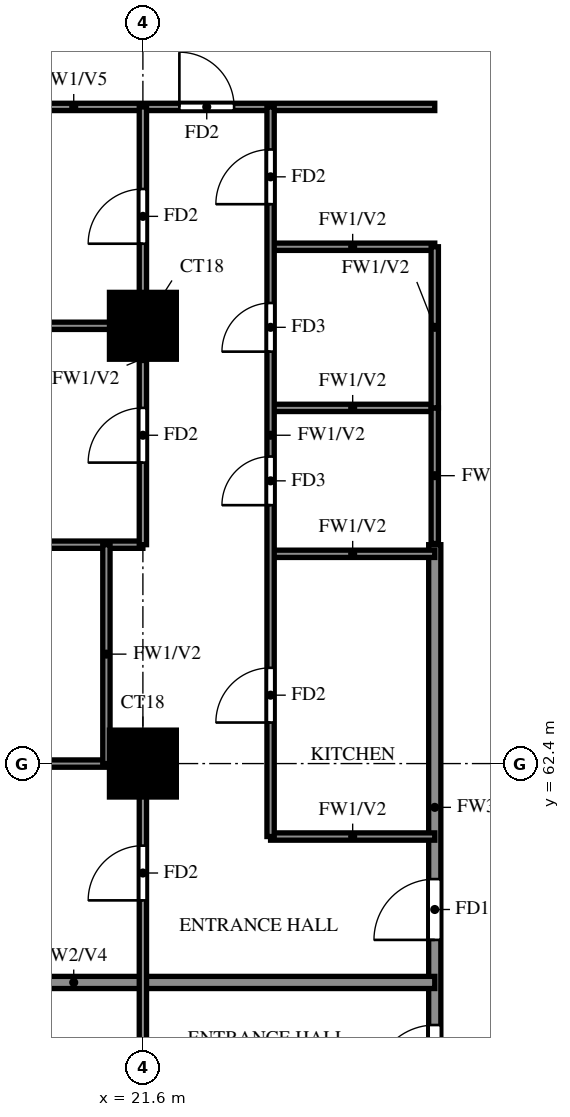
"""IFC4 building model, lengths in metres.
Left out: names, types, materials, properties, quantities, classifications, styles, units other than length and angle.
Written with IfcOpenShell. Run it as: python <this file> out.ifc"""

import sys

from ifc_helpers import new_model, si_unit, direction, frame, frame_2d, origin, origin_2d, place, context, subcontext, project, spatial, rectangle, extrude, source, transform, mapped, element, fill, save


model = new_model("IFC4")
c1 = context("Model", 3, precision=1e-05, world=origin(), true_north=direction((0.0, 1.0)))
c2 = subcontext(c1, "Body", "Model", "MODEL_VIEW")
j1 = project(units=[si_unit("LENGTHUNIT", "METRE"), si_unit("PLANEANGLEUNIT", "RADIAN")], contexts=[c1])
p1 = place(None, origin())
s1 = spatial("IfcSite", under=j1, at=p1, CompositionType="ELEMENT")
p2 = place(p1, origin())
s2 = spatial("IfcBuilding", under=s1, at=p2, CompositionType="ELEMENT")
p3 = place(p2, frame((0.0, 0.0, 127.0)))
s3 = spatial("IfcBuildingStorey", under=s2, at=p3, CompositionType="ELEMENT", Elevation=127.0)
m1 = source(origin(), c2, "Body", "SweptSolid", [
    extrude(rectangle(XDim=1.1, YDim=1.1, at=origin_2d()), origin(), (0.0, 0.0, 1.0), 3.2),
])
for number, where, z_axis, x_axis in (
    (1, (21.6, 62.4, 0.0), (0.0, 0.0, 1.0), (1.0, 0.0, 0.0)),
    (2, (21.6, 69.6, 0.0), (0.0, 0.0, 1.0), (1.0, 0.0, 0.0)),
):
    element("IfcColumn", number, at=place(p3, frame(where, z_axis=z_axis, x_axis=x_axis)), inside=s3, PredefinedType="COLUMN", context=c2, shape_type="MappedRepresentation", body=[
        mapped(m1, transform((0.0, 0.0, 0.0))),
    ])
p4 = place(p3, frame((26.4, 56.4, 0.0), z_axis=(0.0, 0.0, 1.0), x_axis=(0.0, 1.0, 0.0)))
e3 = element("IfcWall", 3, at=p4, inside=s3, PredefinedType="SOLIDWALL", context=c2, shape_type="SweptSolid", body=[
    extrude(rectangle(XDim=9.6, YDim=0.2, at=frame_2d((4.8, 0.0))), origin(), (0.0, 0.0, 1.0), 3.2),
])
p5 = place(p4, frame((0.7, 0.0, 0.0)))
e4 = element("IfcOpeningElement", 4, at=p5, cuts=e3, PredefinedType="OPENING", context=c2, shape_type="SweptSolid", body=[
    extrude(rectangle(XDim=1.0, YDim=2.1, at=frame_2d((0.5, 1.05))), frame((0.0, 0.11, 0.0), z_axis=(0.0, -1.0, 0.0), x_axis=(1.0, 0.0, 0.0)), (0.0, 0.0, 1.0), 0.22),
])
p6 = place(p4, frame((3.1, 0.0, 0.0)))
e5 = element("IfcOpeningElement", 5, at=p6, cuts=e3, PredefinedType="OPENING", context=c2, shape_type="SweptSolid", body=[
    extrude(rectangle(XDim=1.0, YDim=2.1, at=frame_2d((0.5, 1.05))), frame((0.0, 0.11, 0.0), z_axis=(0.0, -1.0, 0.0), x_axis=(1.0, 0.0, 0.0)), (0.0, 0.0, 1.0), 0.22),
])
p7 = place(p3, frame((14.525, 58.8, 0.0), z_axis=(0.0, 0.0, 1.0), x_axis=(1.0, 0.0, 0.0)))
e6 = element("IfcWall", 6, at=p7, inside=s3, PredefinedType="SOLIDWALL", context=c2, shape_type="SweptSolid", body=[
    extrude(rectangle(XDim=11.875, YDim=0.2, at=frame_2d((5.938, 0.0))), origin(), (0.0, 0.0, 1.0), 2.3),
])
p8 = place(p3, frame((23.7, 61.2, 0.0), z_axis=(0.0, 0.0, 1.0), x_axis=(1.0, 0.0, 0.0)))
e7 = element("IfcWall", 7, at=p8, inside=s3, PredefinedType="PARTITIONING", context=c2, shape_type="SweptSolid", body=[
    extrude(rectangle(XDim=2.7, YDim=0.12, at=frame_2d((1.35, 0.0))), origin(), (0.0, 0.0, 1.0), 3.2),
])
p9 = place(p3, frame((14.525, 62.4, 0.0), z_axis=(0.0, 0.0, 1.0), x_axis=(1.0, 0.0, 0.0)))
e8 = element("IfcWall", 8, at=p9, inside=s3, PredefinedType="PARTITIONING", context=c2, shape_type="SweptSolid", body=[
    extrude(rectangle(XDim=7.075, YDim=0.12, at=frame_2d((3.538, 0.0))), origin(), (0.0, 0.0, 1.0), 3.2),
])
p10 = place(p9, frame((2.837, 0.0, 0.0)))
e9 = element("IfcOpeningElement", 9, at=p10, cuts=e8, PredefinedType="OPENING", context=c2, shape_type="SweptSolid", body=[
    extrude(rectangle(XDim=0.8, YDim=2.1, at=frame_2d((0.4, 1.05))), frame((0.0, 0.07, 0.0), z_axis=(0.0, -1.0, 0.0), x_axis=(1.0, 0.0, 0.0)), (0.0, 0.0, 1.0), 0.14),
])
p11 = place(p3, frame((23.7, 65.85, 0.0), z_axis=(0.0, 0.0, 1.0), x_axis=(1.0, 0.0, 0.0)))
e10 = element("IfcWall", 10, at=p11, inside=s3, PredefinedType="PARTITIONING", context=c2, shape_type="SweptSolid", body=[
    extrude(rectangle(XDim=2.7, YDim=0.12, at=frame_2d((1.35, 0.0))), origin(), (0.0, 0.0, 1.0), 3.2),
])
p12 = place(p3, frame((14.525, 66.0, 0.0), z_axis=(0.0, 0.0, 1.0), x_axis=(1.0, 0.0, 0.0)))
e11 = element("IfcWall", 11, at=p12, inside=s3, PredefinedType="PARTITIONING", context=c2, shape_type="SweptSolid", body=[
    extrude(rectangle(XDim=7.075, YDim=0.12, at=frame_2d((3.538, 0.0))), origin(), (0.0, 0.0, 1.0), 2.3),
])
p13 = place(p3, frame((23.7, 68.25, 0.0), z_axis=(0.0, 0.0, 1.0), x_axis=(1.0, 0.0, 0.0)))
e12 = element("IfcWall", 12, at=p13, inside=s3, PredefinedType="PARTITIONING", context=c2, shape_type="SweptSolid", body=[
    extrude(rectangle(XDim=2.7, YDim=0.12, at=frame_2d((1.35, 0.0))), origin(), (0.0, 0.0, 1.0), 3.2),
])
p14 = place(p3, frame((14.525, 69.6, 0.0), z_axis=(0.0, 0.0, 1.0), x_axis=(1.0, 0.0, 0.0)))
e13 = element("IfcWall", 13, at=p14, inside=s3, PredefinedType="PARTITIONING", context=c2, shape_type="SweptSolid", body=[
    extrude(rectangle(XDim=7.075, YDim=0.12, at=frame_2d((3.538, 0.0))), origin(), (0.0, 0.0, 1.0), 3.2),
])
p15 = place(p3, frame((23.7, 70.9, 0.0), z_axis=(0.0, 0.0, 1.0), x_axis=(1.0, 0.0, 0.0)))
e14 = element("IfcWall", 14, at=p15, inside=s3, PredefinedType="PARTITIONING", context=c2, shape_type="SweptSolid", body=[
    extrude(rectangle(XDim=2.7, YDim=0.12, at=frame_2d((1.35, 0.0))), origin(), (0.0, 0.0, 1.0), 3.2),
])
p16 = place(p3, frame((14.525, 73.2, 0.0), z_axis=(0.0, 0.0, 1.0), x_axis=(1.0, 0.0, 0.0)))
e15 = element("IfcWall", 15, at=p16, inside=s3, PredefinedType="PARTITIONING", context=c2, shape_type="SweptSolid", body=[
    extrude(rectangle(XDim=11.875, YDim=0.12, at=frame_2d((5.938, 0.0))), origin(), (0.0, 0.0, 1.0), 2.3),
])
p17 = place(p16, frame((7.675, 0.0, 0.0)))
e16 = element("IfcOpeningElement", 16, at=p17, cuts=e15, PredefinedType="OPENING", context=c2, shape_type="SweptSolid", body=[
    extrude(rectangle(XDim=0.9, YDim=2.1, at=frame_2d((0.45, 1.05))), frame((0.0, 0.07, 0.0), z_axis=(0.0, -1.0, 0.0), x_axis=(1.0, 0.0, 0.0)), (0.0, 0.0, 1.0), 0.14),
])
p18 = place(p3, frame((21.0, 62.4, 0.0), z_axis=(0.0, 0.0, 1.0), x_axis=(0.0, 1.0, 0.0)))
e17 = element("IfcWall", 17, at=p18, inside=s3, PredefinedType="PARTITIONING", context=c2, shape_type="SweptSolid", body=[
    extrude(rectangle(XDim=3.6, YDim=0.12, at=frame_2d((1.8, 0.0))), origin(), (0.0, 0.0, 1.0), 3.2),
])
p19 = place(p3, frame((21.6, 48.0, 0.0), z_axis=(0.0, 0.0, 1.0), x_axis=(0.0, 1.0, 0.0)))
e18 = element("IfcWall", 18, at=p19, inside=s3, PredefinedType="PARTITIONING", context=c2, shape_type="SweptSolid", body=[
    extrude(rectangle(XDim=14.4, YDim=0.12, at=frame_2d((7.2, 0.0))), origin(), (0.0, 0.0, 1.0), 3.2),
])
p20 = place(p19, frame((2.85, 0.0, 0.0)))
e19 = element("IfcOpeningElement", 19, at=p20, cuts=e18, PredefinedType="OPENING", context=c2, shape_type="SweptSolid", body=[
    extrude(rectangle(XDim=1.5, YDim=2.1, at=frame_2d((0.75, 1.05))), frame((0.0, 0.07, 0.0), z_axis=(0.0, -1.0, 0.0), x_axis=(1.0, 0.0, 0.0)), (0.0, 0.0, 1.0), 0.14),
])
p21 = place(p19, frame((8.55, 0.0, 0.0)))
e20 = element("IfcOpeningElement", 20, at=p21, cuts=e18, PredefinedType="OPENING", context=c2, shape_type="SweptSolid", body=[
    extrude(rectangle(XDim=0.9, YDim=2.1, at=frame_2d((0.45, 1.05))), frame((0.0, 0.07, 0.0), z_axis=(0.0, -1.0, 0.0), x_axis=(1.0, 0.0, 0.0)), (0.0, 0.0, 1.0), 0.14),
])
p22 = place(p19, frame((12.15, 0.0, 0.0)))
e21 = element("IfcOpeningElement", 21, at=p22, cuts=e18, PredefinedType="OPENING", context=c2, shape_type="SweptSolid", body=[
    extrude(rectangle(XDim=0.9, YDim=2.1, at=frame_2d((0.45, 1.05))), frame((0.0, 0.07, 0.0), z_axis=(0.0, -1.0, 0.0), x_axis=(1.0, 0.0, 0.0)), (0.0, 0.0, 1.0), 0.14),
])
p23 = place(p3, frame((21.6, 66.0, 0.0), z_axis=(0.0, 0.0, 1.0), x_axis=(0.0, 1.0, 0.0)))
e22 = element("IfcWall", 22, at=p23, inside=s3, PredefinedType="PARTITIONING", context=c2, shape_type="SweptSolid", body=[
    extrude(rectangle(XDim=7.2, YDim=0.12, at=frame_2d((3.6, 0.0))), origin(), (0.0, 0.0, 1.0), 3.2),
])
p24 = place(p23, frame((1.35, 0.0, 0.0)))
e23 = element("IfcOpeningElement", 23, at=p24, cuts=e22, PredefinedType="OPENING", context=c2, shape_type="SweptSolid", body=[
    extrude(rectangle(XDim=0.9, YDim=2.1, at=frame_2d((0.45, 1.05))), frame((0.0, 0.07, 0.0), z_axis=(0.0, -1.0, 0.0), x_axis=(1.0, 0.0, 0.0)), (0.0, 0.0, 1.0), 0.14),
])
p25 = place(p23, frame((4.95, 0.0, 0.0)))
e24 = element("IfcOpeningElement", 24, at=p25, cuts=e22, PredefinedType="OPENING", context=c2, shape_type="SweptSolid", body=[
    extrude(rectangle(XDim=0.9, YDim=2.1, at=frame_2d((0.45, 1.05))), frame((0.0, 0.07, 0.0), z_axis=(0.0, -1.0, 0.0), x_axis=(1.0, 0.0, 0.0)), (0.0, 0.0, 1.0), 0.14),
])
p26 = place(p3, frame((23.7, 61.2, 0.0), z_axis=(0.0, 0.0, 1.0), x_axis=(0.0, 1.0, 0.0)))
e25 = element("IfcWall", 25, at=p26, inside=s3, PredefinedType="PARTITIONING", context=c2, shape_type="SweptSolid", body=[
    extrude(rectangle(XDim=12.0, YDim=0.12, at=frame_2d((6.0, 0.0))), origin(), (0.0, 0.0, 1.0), 3.2),
])
p27 = place(p26, frame((1.875, 0.0, 0.0)))
e26 = element("IfcOpeningElement", 26, at=p27, cuts=e25, PredefinedType="OPENING", context=c2, shape_type="SweptSolid", body=[
    extrude(rectangle(XDim=0.9, YDim=2.1, at=frame_2d((0.45, 1.05))), frame((0.0, 0.07, 0.0), z_axis=(0.0, -1.0, 0.0), x_axis=(1.0, 0.0, 0.0)), (0.0, 0.0, 1.0), 0.14),
])
p28 = place(p26, frame((5.45, 0.0, 0.0)))
e27 = element("IfcOpeningElement", 27, at=p28, cuts=e25, PredefinedType="OPENING", context=c2, shape_type="SweptSolid", body=[
    extrude(rectangle(XDim=0.8, YDim=2.1, at=frame_2d((0.4, 1.05))), frame((0.0, 0.07, 0.0), z_axis=(0.0, -1.0, 0.0), x_axis=(1.0, 0.0, 0.0)), (0.0, 0.0, 1.0), 0.14),
])
p29 = place(p26, frame((7.975, 0.0, 0.0)))
e28 = element("IfcOpeningElement", 28, at=p29, cuts=e25, PredefinedType="OPENING", context=c2, shape_type="SweptSolid", body=[
    extrude(rectangle(XDim=0.8, YDim=2.1, at=frame_2d((0.4, 1.05))), frame((0.0, 0.07, 0.0), z_axis=(0.0, -1.0, 0.0), x_axis=(1.0, 0.0, 0.0)), (0.0, 0.0, 1.0), 0.14),
])
p30 = place(p26, frame((10.4, 0.0, 0.0)))
e29 = element("IfcOpeningElement", 29, at=p30, cuts=e25, PredefinedType="OPENING", context=c2, shape_type="SweptSolid", body=[
    extrude(rectangle(XDim=0.9, YDim=2.1, at=frame_2d((0.45, 1.05))), frame((0.0, 0.07, 0.0), z_axis=(0.0, -1.0, 0.0), x_axis=(1.0, 0.0, 0.0)), (0.0, 0.0, 1.0), 0.14),
])
p31 = place(p3, frame((26.4, 66.02, 0.0), z_axis=(0.0, 0.0, 1.0), x_axis=(0.0, 1.0, 0.0)))
e30 = element("IfcWall", 30, at=p31, inside=s3, PredefinedType="PARTITIONING", context=c2, shape_type="SweptSolid", body=[
    extrude(rectangle(XDim=2.23, YDim=0.12, at=frame_2d((1.115, 0.0))), origin(), (0.0, 0.0, 1.0), 3.2),
])
p32 = place(p3, frame((26.4, 68.25, 0.0), z_axis=(0.0, 0.0, 1.0), x_axis=(0.0, 1.0, 0.0)))
e31 = element("IfcWall", 31, at=p32, inside=s3, PredefinedType="PARTITIONING", context=c2, shape_type="SweptSolid", body=[
    extrude(rectangle(XDim=2.65, YDim=0.12, at=frame_2d((1.325, 0.0))), origin(), (0.0, 0.0, 1.0), 3.2),
])
p33 = place(p5, origin())
e32 = element("IfcDoor", 32, at=p33, inside=s3, OperationType="SINGLE_SWING_RIGHT", PredefinedType="DOOR", context=c2, shape_type="SweptSolid", body=[
    extrude(rectangle(XDim=1.0, YDim=2.1, at=frame_2d((0.5, 1.05))), frame((0.0, 0.025, 0.0), z_axis=(0.0, -1.0, 0.0), x_axis=(1.0, 0.0, 0.0)), (0.0, 0.0, 1.0), 0.05),
])
fill(e4, e32)
p34 = place(p6, origin())
e33 = element("IfcDoor", 33, at=p34, inside=s3, OperationType="SINGLE_SWING_RIGHT", PredefinedType="DOOR", context=c2, shape_type="SweptSolid", body=[
    extrude(rectangle(XDim=1.0, YDim=2.1, at=frame_2d((0.5, 1.05))), frame((0.0, 0.025, 0.0), z_axis=(0.0, -1.0, 0.0), x_axis=(1.0, 0.0, 0.0)), (0.0, 0.0, 1.0), 0.05),
])
fill(e5, e33)
p35 = place(p22, origin())
e34 = element("IfcDoor", 34, at=p35, inside=s3, OperationType="SINGLE_SWING_LEFT", PredefinedType="DOOR", context=c2, shape_type="SweptSolid", body=[
    extrude(rectangle(XDim=0.9, YDim=2.1, at=frame_2d((0.45, 1.05))), frame((0.0, 0.025, 0.0), z_axis=(0.0, -1.0, 0.0), x_axis=(1.0, 0.0, 0.0)), (0.0, 0.0, 1.0), 0.05),
])
fill(e21, e34)
p36 = place(p24, origin())
e35 = element("IfcDoor", 35, at=p36, inside=s3, OperationType="SINGLE_SWING_RIGHT", PredefinedType="DOOR", context=c2, shape_type="SweptSolid", body=[
    extrude(rectangle(XDim=0.9, YDim=2.1, at=frame_2d((0.45, 1.05))), frame((0.0, 0.025, 0.0), z_axis=(0.0, -1.0, 0.0), x_axis=(1.0, 0.0, 0.0)), (0.0, 0.0, 1.0), 0.05),
])
fill(e23, e35)
p37 = place(p25, origin())
e36 = element("IfcDoor", 36, at=p37, inside=s3, OperationType="SINGLE_SWING_LEFT", PredefinedType="DOOR", context=c2, shape_type="SweptSolid", body=[
    extrude(rectangle(XDim=0.9, YDim=2.1, at=frame_2d((0.45, 1.05))), frame((0.0, 0.025, 0.0), z_axis=(0.0, -1.0, 0.0), x_axis=(1.0, 0.0, 0.0)), (0.0, 0.0, 1.0), 0.05),
])
fill(e24, e36)
p38 = place(p17, origin())
e37 = element("IfcDoor", 37, at=p38, inside=s3, OperationType="SINGLE_SWING_LEFT", PredefinedType="DOOR", context=c2, shape_type="SweptSolid", body=[
    extrude(rectangle(XDim=0.9, YDim=2.1, at=frame_2d((0.45, 1.05))), frame((0.0, 0.025, 0.0), z_axis=(0.0, -1.0, 0.0), x_axis=(1.0, 0.0, 0.0)), (0.0, 0.0, 1.0), 0.05),
])
fill(e16, e37)
p39 = place(p27, origin())
e38 = element("IfcDoor", 38, at=p39, inside=s3, OperationType="SINGLE_SWING_RIGHT", PredefinedType="DOOR", context=c2, shape_type="SweptSolid", body=[
    extrude(rectangle(XDim=0.9, YDim=2.1, at=frame_2d((0.45, 1.05))), frame((0.0, 0.025, 0.0), z_axis=(0.0, -1.0, 0.0), x_axis=(1.0, 0.0, 0.0)), (0.0, 0.0, 1.0), 0.05),
])
fill(e26, e38)
p40 = place(p28, origin())
e39 = element("IfcDoor", 39, at=p40, inside=s3, OperationType="SINGLE_SWING_LEFT", PredefinedType="DOOR", context=c2, shape_type="SweptSolid", body=[
    extrude(rectangle(XDim=0.8, YDim=2.1, at=frame_2d((0.4, 1.05))), frame((0.0, 0.025, 0.0), z_axis=(0.0, -1.0, 0.0), x_axis=(1.0, 0.0, 0.0)), (0.0, 0.0, 1.0), 0.05),
])
fill(e27, e39)
p41 = place(p29, origin())
e40 = element("IfcDoor", 40, at=p41, inside=s3, OperationType="SINGLE_SWING_LEFT", PredefinedType="DOOR", context=c2, shape_type="SweptSolid", body=[
    extrude(rectangle(XDim=0.8, YDim=2.1, at=frame_2d((0.4, 1.05))), frame((0.0, 0.025, 0.0), z_axis=(0.0, -1.0, 0.0), x_axis=(1.0, 0.0, 0.0)), (0.0, 0.0, 1.0), 0.05),
])
fill(e28, e40)
p42 = place(p30, origin())
e41 = element("IfcDoor", 41, at=p42, inside=s3, OperationType="SINGLE_SWING_RIGHT", PredefinedType="DOOR", context=c2, shape_type="SweptSolid", body=[
    extrude(rectangle(XDim=0.9, YDim=2.1, at=frame_2d((0.45, 1.05))), frame((0.0, 0.025, 0.0), z_axis=(0.0, -1.0, 0.0), x_axis=(1.0, 0.0, 0.0)), (0.0, 0.0, 1.0), 0.05),
])
fill(e29, e41)
save(model, sys.argv[1])
